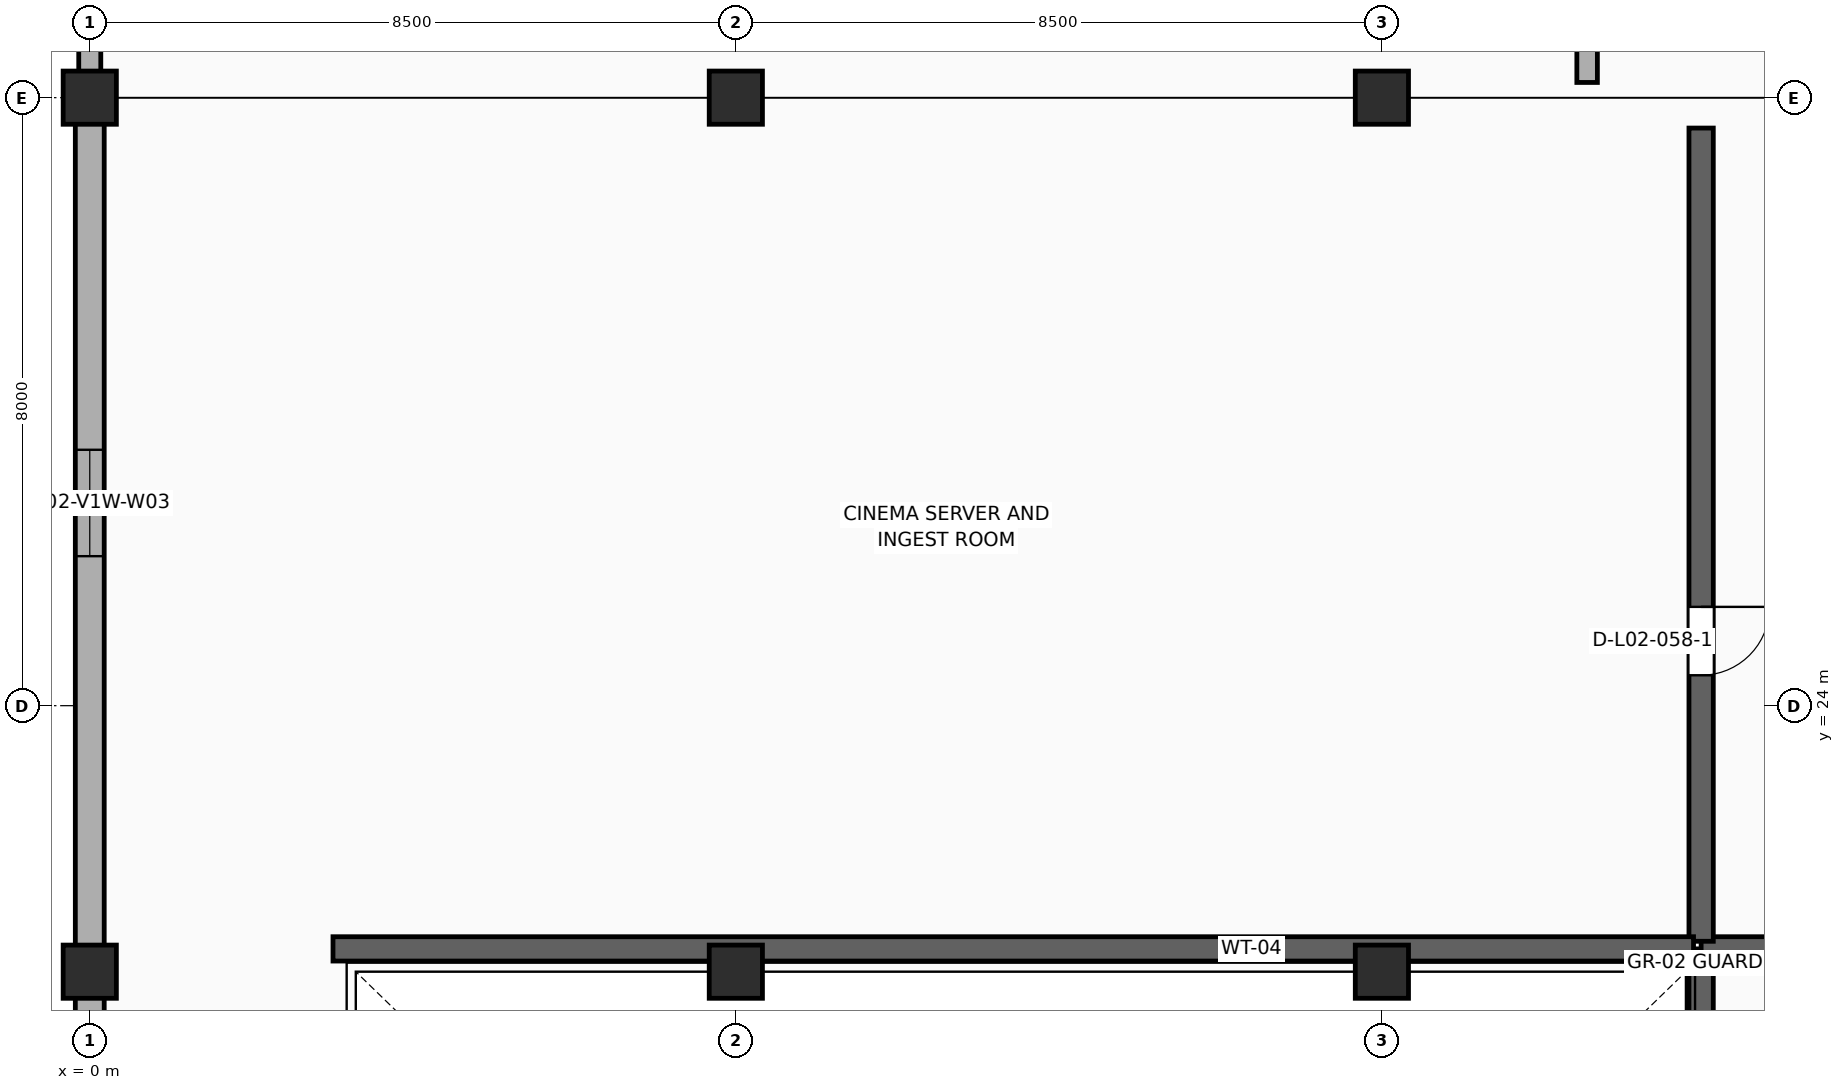
"""IFC4 building model, lengths in metres.
Left out: names, types, materials, properties, quantities, classifications, styles, units other than length and angle.
Written with IfcOpenShell. Run it as: python <this file> out.ifc"""

import sys

from ifc_helpers import new_model, si_unit, direction, frame, frame_2d, origin, origin_2d, place, context, subcontext, project, spatial, rectangle, extrude, element, fill, save


model = new_model("IFC4")
c1 = context("Model", 3, precision=1e-05, world=origin(), true_north=direction((0.0, 1.0)))
c2 = subcontext(c1, "Body", "Model", "MODEL_VIEW")
j1 = project(units=[si_unit("LENGTHUNIT", "METRE"), si_unit("PLANEANGLEUNIT", "RADIAN")], contexts=[c1])
p1 = place(None, origin())
s1 = spatial("IfcSite", under=j1, at=p1, CompositionType="ELEMENT")
p2 = place(p1, origin())
s2 = spatial("IfcBuilding", under=s1, at=p2, CompositionType="ELEMENT")
p3 = place(p2, frame((0.0, 0.0, 10.2)))
s3 = spatial("IfcBuildingStorey", under=s2, at=p3, CompositionType="ELEMENT", Elevation=10.2)
p4 = place(p3, frame((0.0, 20.5, 0.0), z_axis=(0.0, 0.0, 1.0), x_axis=(1.0, 0.0, 0.0)))
e1 = element("IfcColumn", 1, at=p4, inside=s3, PredefinedType="COLUMN", context=c2, shape_type="SweptSolid", body=[
    extrude(rectangle(XDim=0.7, YDim=0.7, at=origin_2d()), origin(), (0.0, 0.0, 1.0), 4.7),
])
p5 = place(p3, frame((0.0, 32.0, 0.0), z_axis=(0.0, 0.0, 1.0), x_axis=(1.0, 0.0, 0.0)))
e2 = element("IfcColumn", 2, at=p5, inside=s3, PredefinedType="COLUMN", context=c2, shape_type="SweptSolid", body=[
    extrude(rectangle(XDim=0.7, YDim=0.7, at=origin_2d()), origin(), (0.0, 0.0, 1.0), 4.54),
])
p6 = place(p3, frame((8.5, 20.5, 0.0), z_axis=(0.0, 0.0, 1.0), x_axis=(1.0, 0.0, 0.0)))
e3 = element("IfcColumn", 3, at=p6, inside=s3, PredefinedType="COLUMN", context=c2, shape_type="SweptSolid", body=[
    extrude(rectangle(XDim=0.7, YDim=0.7, at=origin_2d()), origin(), (0.0, 0.0, 1.0), 4.7),
])
p7 = place(p3, frame((8.5, 32.0, 0.0), z_axis=(0.0, 0.0, 1.0), x_axis=(1.0, 0.0, 0.0)))
e4 = element("IfcColumn", 4, at=p7, inside=s3, PredefinedType="COLUMN", context=c2, shape_type="SweptSolid", body=[
    extrude(rectangle(XDim=0.7, YDim=0.7, at=origin_2d()), origin(), (0.0, 0.0, 1.0), 4.54),
])
p8 = place(p3, frame((17.0, 20.5, 0.0), z_axis=(0.0, 0.0, 1.0), x_axis=(1.0, 0.0, 0.0)))
e5 = element("IfcColumn", 5, at=p8, inside=s3, PredefinedType="COLUMN", context=c2, shape_type="SweptSolid", body=[
    extrude(rectangle(XDim=0.7, YDim=0.7, at=origin_2d()), origin(), (0.0, 0.0, 1.0), 4.7),
])
p9 = place(p3, frame((17.0, 32.0, 0.0), z_axis=(0.0, 0.0, 1.0), x_axis=(1.0, 0.0, 0.0)))
e6 = element("IfcColumn", 6, at=p9, inside=s3, PredefinedType="COLUMN", context=c2, shape_type="SweptSolid", body=[
    extrude(rectangle(XDim=0.7, YDim=0.7, at=origin_2d()), origin(), (0.0, 0.0, 1.0), 4.54),
])
p10 = place(p3, frame((0.0, 0.0, 0.0), z_axis=(0.0, 0.0, 1.0), x_axis=(0.0, 1.0, 0.0)))
e7 = element("IfcWall", 7, at=p10, inside=s3, PredefinedType="STANDARD", context=c2, shape_type="SweptSolid", body=[
    extrude(rectangle(XDim=32.0, YDim=0.38, at=frame_2d((16.0, 0.0))), origin(), (0.0, 0.0, 1.0), 4.37),
])
p11 = place(p10, frame((4.633, 0.0, 1.2)))
e8 = element("IfcOpeningElement", 8, at=p11, cuts=e7, PredefinedType="OPENING", context=c2, shape_type="SweptSolid", body=[
    extrude(rectangle(XDim=1.4, YDim=1.5, at=frame_2d((0.7, 0.75))), frame((0.0, 0.202, 0.0), z_axis=(0.0, -1.0, 0.0), x_axis=(1.0, 0.0, 0.0)), (0.0, 0.0, 1.0), 0.404),
])
p12 = place(p10, frame((15.3, 0.0, 1.2)))
e9 = element("IfcOpeningElement", 9, at=p12, cuts=e7, PredefinedType="OPENING", context=c2, shape_type="SweptSolid", body=[
    extrude(rectangle(XDim=1.4, YDim=1.5, at=frame_2d((0.7, 0.75))), frame((0.0, 0.202, 0.0), z_axis=(0.0, -1.0, 0.0), x_axis=(1.0, 0.0, 0.0)), (0.0, 0.0, 1.0), 0.404),
])
p13 = place(p10, frame((25.967, 0.0, 1.2)))
e10 = element("IfcOpeningElement", 10, at=p13, cuts=e7, PredefinedType="OPENING", context=c2, shape_type="SweptSolid", body=[
    extrude(rectangle(XDim=1.4, YDim=1.5, at=frame_2d((0.7, 0.75))), frame((0.0, 0.202, 0.0), z_axis=(0.0, -1.0, 0.0), x_axis=(1.0, 0.0, 0.0)), (0.0, 0.0, 1.0), 0.404),
])
p14 = place(p3, frame((0.0, 32.0, 0.0), z_axis=(0.0, 0.0, 1.0), x_axis=(0.0, 1.0, 0.0)))
e11 = element("IfcWall", 11, at=p14, inside=s3, PredefinedType="STANDARD", context=c2, shape_type="SweptSolid", body=[
    extrude(rectangle(XDim=48.5, YDim=0.29, at=frame_2d((24.25, 0.0))), origin(), (0.0, 0.0, 1.0), 3.68),
])
p15 = place(p14, frame((3.35, 0.0, 2.12)))
e12 = element("IfcOpeningElement", 12, at=p15, cuts=e11, PredefinedType="OPENING", context=c2, shape_type="SweptSolid", body=[
    extrude(rectangle(XDim=3.0, YDim=1.4, at=frame_2d((1.5, 0.7))), frame((0.0, 0.157, 0.0), z_axis=(0.0, -1.0, 0.0), x_axis=(1.0, 0.0, 0.0)), (0.0, 0.0, 1.0), 0.314),
])
p16 = place(p14, frame((32.83, 0.0, 2.12)))
e13 = element("IfcOpeningElement", 13, at=p16, cuts=e11, PredefinedType="OPENING", context=c2, shape_type="SweptSolid", body=[
    extrude(rectangle(XDim=3.0, YDim=1.4, at=frame_2d((1.5, 0.7))), frame((0.0, 0.157, 0.0), z_axis=(0.0, -1.0, 0.0), x_axis=(1.0, 0.0, 0.0)), (0.0, 0.0, 1.0), 0.314),
])
p17 = place(p14, frame((42.15, 0.0, 2.12)))
e14 = element("IfcOpeningElement", 14, at=p17, cuts=e11, PredefinedType="OPENING", context=c2, shape_type="SweptSolid", body=[
    extrude(rectangle(XDim=3.0, YDim=1.4, at=frame_2d((1.5, 0.7))), frame((0.0, 0.157, 0.0), z_axis=(0.0, -1.0, 0.0), x_axis=(1.0, 0.0, 0.0)), (0.0, 0.0, 1.0), 0.314),
])
p18 = place(p3, frame((21.2, 3.2, 0.0), z_axis=(0.0, 0.0, 1.0), x_axis=(0.0, 1.0, 0.0)))
e15 = element("IfcWall", 15, at=p18, inside=s3, PredefinedType="SHEAR", context=c2, shape_type="SweptSolid", body=[
    extrude(rectangle(XDim=17.6, YDim=0.32, at=frame_2d((8.8, 0.0))), origin(), (0.0, 0.0, 1.0), 4.5),
])
p19 = place(p18, frame((8.0, 0.0, 1.2)))
e16 = element("IfcOpeningElement", 16, at=p19, cuts=e15, PredefinedType="OPENING", context=c2, shape_type="SweptSolid", body=[
    extrude(rectangle(XDim=1.4, YDim=1.0, at=frame_2d((0.7, 0.5))), frame((0.0, 0.172, 0.0), z_axis=(0.0, -1.0, 0.0), x_axis=(1.0, 0.0, 0.0)), (0.0, 0.0, 1.0), 0.344),
])
p20 = place(p18, frame((12.0, 0.0, 1.2)))
e17 = element("IfcOpeningElement", 17, at=p20, cuts=e15, PredefinedType="OPENING", context=c2, shape_type="SweptSolid", body=[
    extrude(rectangle(XDim=1.4, YDim=1.0, at=frame_2d((0.7, 0.5))), frame((0.0, 0.172, 0.0), z_axis=(0.0, -1.0, 0.0), x_axis=(1.0, 0.0, 0.0)), (0.0, 0.0, 1.0), 0.344),
])
p21 = place(p3, frame((21.2, 20.8, 0.0), z_axis=(0.0, 0.0, 1.0), x_axis=(1.0, 0.0, 0.0)))
e18 = element("IfcWall", 18, at=p21, inside=s3, PredefinedType="SHEAR", context=c2, shape_type="SweptSolid", body=[
    extrude(rectangle(XDim=12.3, YDim=0.32, at=frame_2d((6.15, 0.0))), origin(), (0.0, 0.0, 1.0), 4.5),
])
p22 = place(p21, frame((6.8, 0.0, 0.0)))
e19 = element("IfcOpeningElement", 19, at=p22, cuts=e18, PredefinedType="OPENING", context=c2, shape_type="SweptSolid", body=[
    extrude(rectangle(XDim=1.05, YDim=2.15, at=frame_2d((0.525, 1.075))), frame((0.0, 0.172, 0.0), z_axis=(0.0, -1.0, 0.0), x_axis=(1.0, 0.0, 0.0)), (0.0, 0.0, 1.0), 0.344),
])
p23 = place(p3, frame((21.2, 20.9, 0.0), z_axis=(0.0, 0.0, 1.0), x_axis=(0.0, 1.0, 0.0)))
e20 = element("IfcWall", 20, at=p23, inside=s3, PredefinedType="SHEAR", context=c2, shape_type="SweptSolid", body=[
    extrude(rectangle(XDim=10.7, YDim=0.32, at=frame_2d((5.35, 0.0))), origin(), (0.0, 0.0, 1.0), 4.5),
])
p24 = place(p23, frame((3.5, 0.0, 0.0)))
e21 = element("IfcOpeningElement", 21, at=p24, cuts=e20, PredefinedType="OPENING", context=c2, shape_type="SweptSolid", body=[
    extrude(rectangle(XDim=0.9, YDim=2.1, at=frame_2d((0.45, 1.05))), frame((0.0, 0.172, 0.0), z_axis=(0.0, -1.0, 0.0), x_axis=(1.0, 0.0, 0.0)), (0.0, 0.0, 1.0), 0.344),
])
p25 = place(p3, frame((3.2, 20.8, 0.0), z_axis=(0.0, 0.0, 1.0), x_axis=(1.0, 0.0, 0.0)))
e22 = element("IfcWall", 22, at=p25, inside=s3, PredefinedType="SHEAR", context=c2, shape_type="SweptSolid", body=[
    extrude(rectangle(XDim=17.9, YDim=0.32, at=frame_2d((8.95, 0.0))), origin(), (0.0, 0.0, 1.0), 4.5),
])
p26 = place(p3, frame((19.7, 32.2, 0.0), z_axis=(0.0, 0.0, 1.0), x_axis=(0.0, 1.0, 0.0)))
e23 = element("IfcWall", 23, at=p26, inside=s3, PredefinedType="PARTITIONING", context=c2, shape_type="SweptSolid", body=[
    extrude(rectangle(XDim=48.0, YDim=0.27, at=frame_2d((24.0, 0.0))), origin(), (0.0, 0.0, 1.0), 3.68),
])
p27 = place(p26, frame((7.0, 0.0, 0.0)))
e24 = element("IfcOpeningElement", 24, at=p27, cuts=e23, PredefinedType="OPENING", context=c2, shape_type="SweptSolid", body=[
    extrude(rectangle(XDim=1.8, YDim=2.4, at=frame_2d((0.9, 1.2))), frame((0.0, 0.147, 0.0), z_axis=(0.0, -1.0, 0.0), x_axis=(1.0, 0.0, 0.0)), (0.0, 0.0, 1.0), 0.294),
])
p28 = place(p26, frame((23.0, 0.0, 0.0)))
e25 = element("IfcOpeningElement", 25, at=p28, cuts=e23, PredefinedType="OPENING", context=c2, shape_type="SweptSolid", body=[
    extrude(rectangle(XDim=1.8, YDim=2.4, at=frame_2d((0.9, 1.2))), frame((0.0, 0.147, 0.0), z_axis=(0.0, -1.0, 0.0), x_axis=(1.0, 0.0, 0.0)), (0.0, 0.0, 1.0), 0.294),
])
p29 = place(p26, frame((38.0, 0.0, 0.0)))
e26 = element("IfcOpeningElement", 26, at=p29, cuts=e23, PredefinedType="OPENING", context=c2, shape_type="SweptSolid", body=[
    extrude(rectangle(XDim=1.0, YDim=2.15, at=frame_2d((0.5, 1.075))), frame((0.0, 0.147, 0.0), z_axis=(0.0, -1.0, 0.0), x_axis=(1.0, 0.0, 0.0)), (0.0, 0.0, 1.0), 0.294),
])
p30 = place(p13, origin())
e27 = element("IfcWindow", 27, at=p30, inside=s3, PartitioningType="SINGLE_PANEL", PredefinedType="WINDOW", context=c2, shape_type="SweptSolid", body=[
    extrude(rectangle(XDim=1.4, YDim=1.5, at=frame_2d((0.7, 0.75))), frame((0.0, 0.03, 0.0), z_axis=(0.0, -1.0, 0.0), x_axis=(1.0, 0.0, 0.0)), (0.0, 0.0, 1.0), 0.06),
])
fill(e10, e27)
p31 = place(p24, frame((0.9, 0.0, 0.0), z_axis=(0.0, 0.0, 1.0), x_axis=(-1.0, 0.0, 0.0)))
e28 = element("IfcDoor", 28, at=p31, inside=s3, OperationType="SINGLE_SWING_RIGHT", PredefinedType="DOOR", context=c2, shape_type="SweptSolid", body=[
    extrude(rectangle(XDim=0.9, YDim=2.1, at=frame_2d((0.45, 1.05))), frame((0.0, 0.025, 0.0), z_axis=(0.0, -1.0, 0.0), x_axis=(1.0, 0.0, 0.0)), (0.0, 0.0, 1.0), 0.05),
])
fill(e21, e28)
save(model, sys.argv[1])
